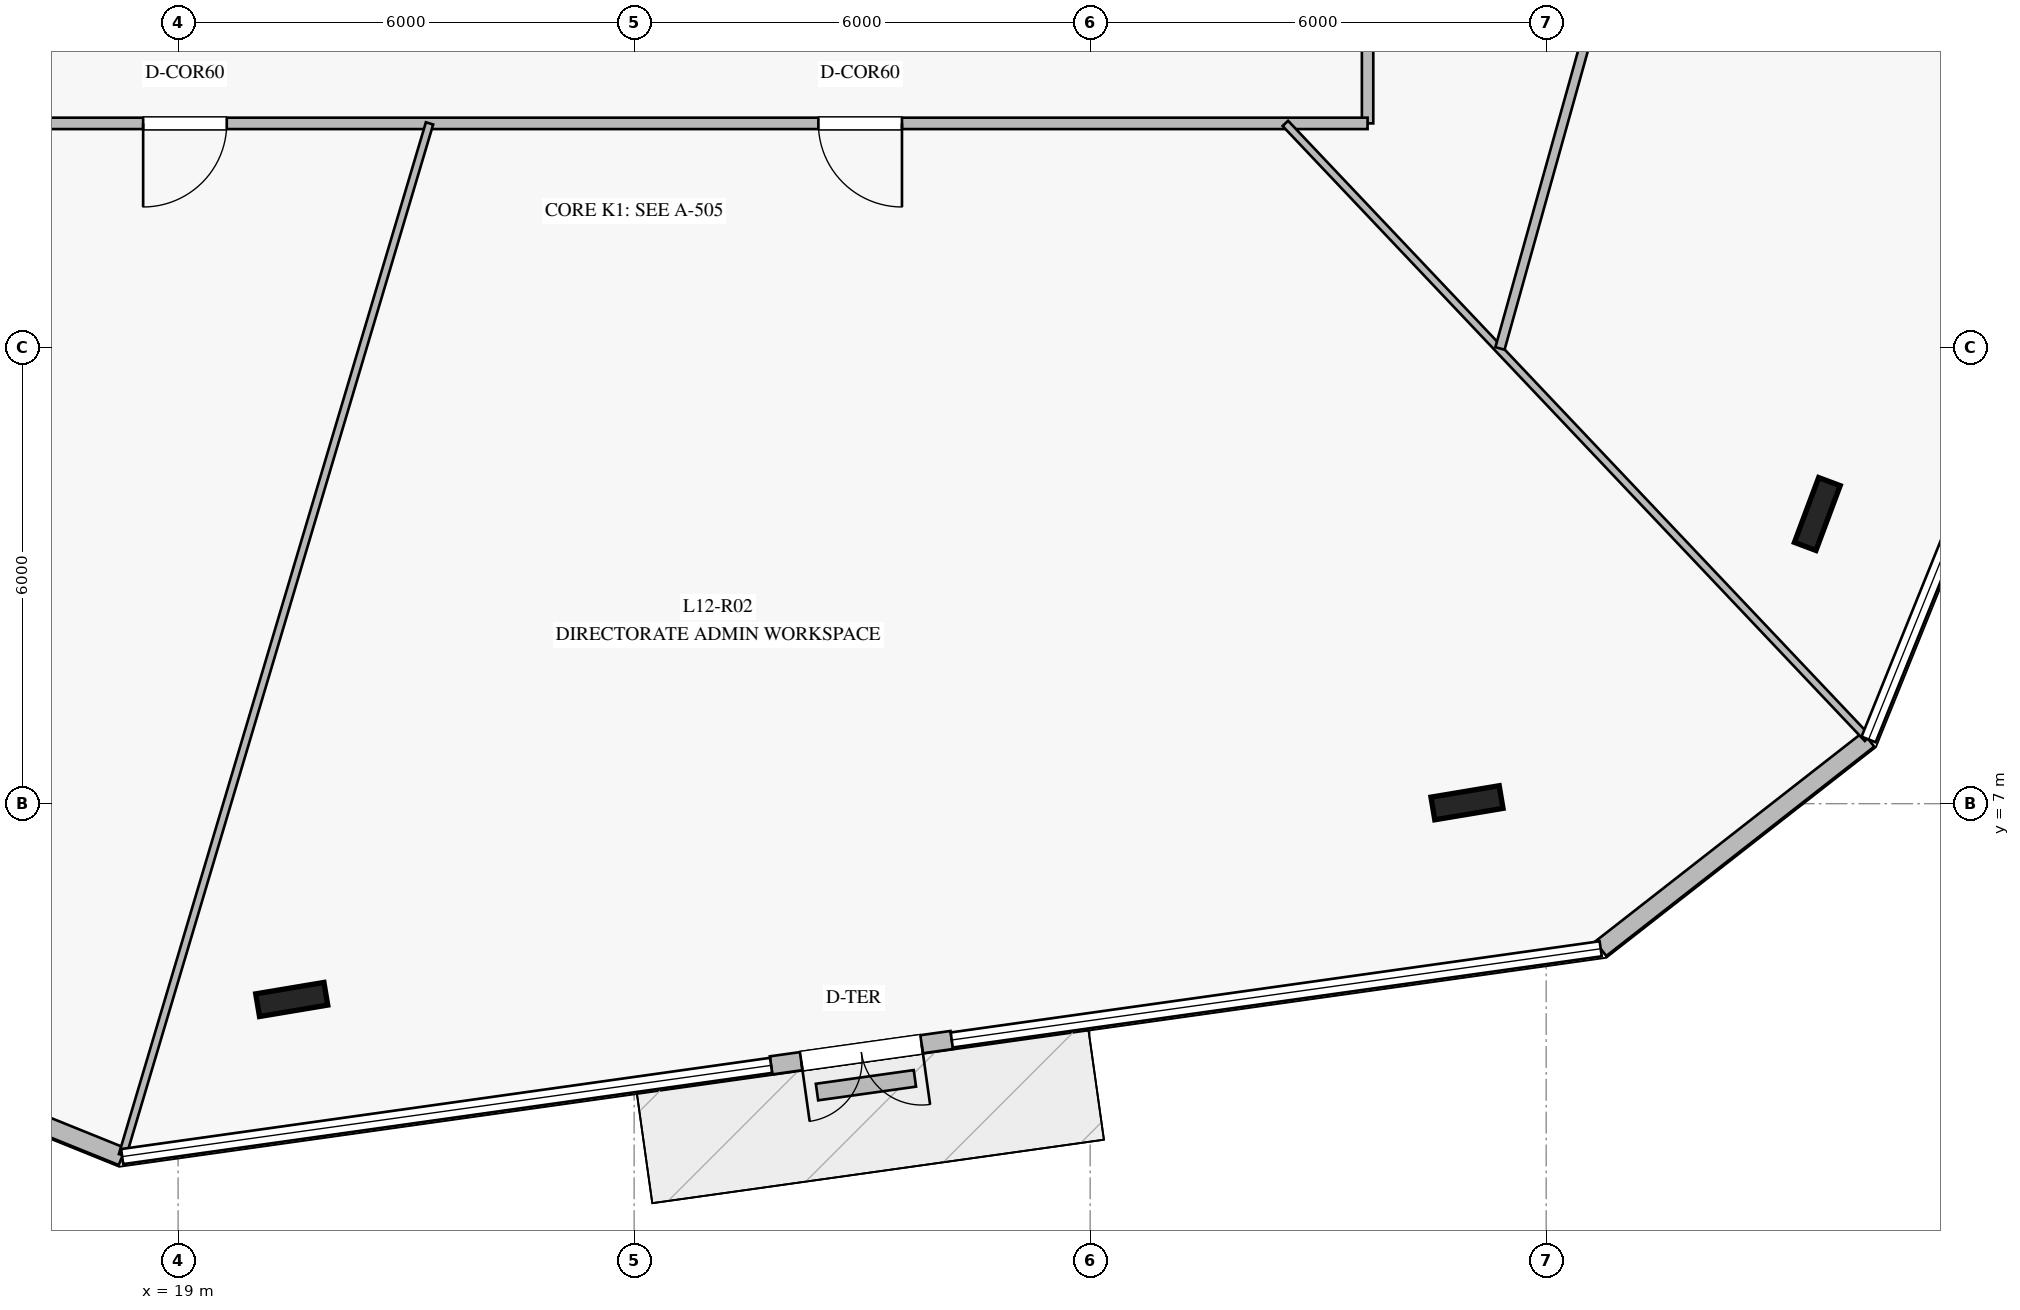
"""IFC4 building model, lengths in metres.
Left out: names, types, materials, properties, quantities, classifications, styles, units other than length and angle.
Written with IfcOpenShell. Run it as: python <this file> out.ifc"""

import sys

from ifc_helpers import new_model, si_unit, direction, frame, frame_2d, origin, origin_2d, place, context, subcontext, project, spatial, rectangle, i_section, extrude, element, fill, save


model = new_model("IFC4")
c1 = context("Model", 3, precision=1e-05, world=origin(), true_north=direction((0.0, 1.0)))
c2 = subcontext(c1, "Body", "Model", "MODEL_VIEW")
j1 = project(units=[si_unit("LENGTHUNIT", "METRE"), si_unit("PLANEANGLEUNIT", "RADIAN")], contexts=[c1])
p1 = place(None, origin())
s1 = spatial("IfcSite", under=j1, at=p1, CompositionType="ELEMENT")
p2 = place(p1, origin())
s2 = spatial("IfcBuilding", under=s1, at=p2, CompositionType="ELEMENT")
p3 = place(p2, frame((0.0, 0.0, 52.0)))
s3 = spatial("IfcBuildingStorey", under=s2, at=p3, CompositionType="ELEMENT", Elevation=52.0)
for number, where, z_axis, x_axis in (
    (1, (20.495, 4.424, 0.0), (0.0, 0.0, 1.0), (0.986, 0.165, 0.0)),
    (2, (35.958, 7.012, 0.0), (0.0, 0.0, 1.0), (0.986, 0.165, 0.0)),
    (3, (40.567, 10.811, 0.0), (0.0, 0.0, 1.0), (0.35, 0.937, 0.0)),
):
    element("IfcColumn", number, at=place(p3, frame(where, z_axis=z_axis, x_axis=x_axis)), inside=s3, PredefinedType="COLUMN", context=c2, shape_type="SweptSolid", body=[
        extrude(i_section(OverallWidth=0.302, OverallDepth=0.91, WebThickness=0.021, FlangeThickness=0.04, at=origin_2d()), origin(), (0.0, 0.0, 1.0), 4.0),
    ])
p4 = place(p3, frame((14.116, 4.033, 0.0), z_axis=(0.0, 0.0, 1.0), x_axis=(0.927172587255, -0.374634479783, 0.0)))
e4 = element("IfcWall", 4, at=p4, inside=s3, PredefinedType="STANDARD", context=c2, shape_type="SweptSolid", body=[
    extrude(rectangle(XDim=4.474, YDim=0.24, at=frame_2d((2.237, 0.0))), origin(), (0.0, 0.0, 1.0), 3.76),
])
p5 = place(p3, frame((26.802, 3.557, 0.0), z_axis=(0.0, 0.0, 1.0), x_axis=(0.990258331978, 0.139242364059, 0.0)))
e5 = element("IfcWall", 5, at=p5, inside=s3, PredefinedType="STANDARD", context=c2, shape_type="SweptSolid", body=[
    extrude(rectangle(XDim=2.4, YDim=0.24, at=frame_2d((1.2, 0.0))), origin(), (0.0, 0.0, 1.0), 3.76),
])
p6 = place(p5, frame((0.4, 0.0, 0.0)))
e6 = element("IfcOpeningElement", 6, at=p6, cuts=e5, PredefinedType="OPENING", context=c2, shape_type="SweptSolid", body=[
    extrude(rectangle(XDim=1.6, YDim=2.25, at=frame_2d((0.8, 1.125))), frame((0.0, 0.13, 0.0), z_axis=(0.0, -1.0, 0.0), x_axis=(1.0, 0.0, 0.0)), (0.0, 0.0, 1.0), 0.26),
])
p7 = place(p3, frame((37.717, 5.091, 0.0), z_axis=(0.0, 0.0, 1.0), x_axis=(0.788016099046, 0.615654633414, 0.0)))
e7 = element("IfcWall", 7, at=p7, inside=s3, PredefinedType="STANDARD", context=c2, shape_type="SweptSolid", body=[
    extrude(rectangle(XDim=4.473, YDim=0.24, at=frame_2d((2.237, 0.0))), origin(), (0.0, 0.0, 1.0), 3.76),
])
p8 = place(p3, frame((27.406, 3.206, 0.0), z_axis=(0.0, 0.0, 1.0), x_axis=(0.990383971487, 0.138345903523, 0.0)))
e8 = element("IfcWall", 8, at=p8, inside=s3, PredefinedType="USERDEFINED", context=c2, shape_type="SweptSolid", body=[
    extrude(rectangle(XDim=1.301, YDim=0.22, at=frame_2d((0.65, 0.0))), origin(), (0.0, 0.0, 1.0), 0.4),
])
p9 = place(p3, frame((34.65, 34.05, 0.0), z_axis=(0.0, 0.0, 1.0), x_axis=(0.0, -1.0, 0.0)))
e9 = element("IfcWall", 9, at=p9, inside=s3, PredefinedType="PARTITIONING", context=c2, shape_type="SweptSolid", body=[
    extrude(rectangle(XDim=18.1, YDim=0.15, at=frame_2d((9.05, 0.0))), origin(), (0.0, 0.0, 1.0), 3.21),
])
p10 = place(p9, frame((12.534, 0.0, 0.0)))
e10 = element("IfcOpeningElement", 10, at=p10, cuts=e9, PredefinedType="OPENING", context=c2, shape_type="SweptSolid", body=[
    extrude(rectangle(XDim=1.1, YDim=2.2, at=frame_2d((0.55, 1.1))), frame((0.0, 0.085, 0.0), z_axis=(0.0, -1.0, 0.0), x_axis=(1.0, 0.0, 0.0)), (0.0, 0.0, 1.0), 0.17),
])
p11 = place(p9, frame((3.853, 0.0, 0.0)))
e11 = element("IfcOpeningElement", 11, at=p11, cuts=e9, PredefinedType="OPENING", context=c2, shape_type="SweptSolid", body=[
    extrude(rectangle(XDim=1.1, YDim=2.2, at=frame_2d((0.55, 1.1))), frame((0.0, 0.085, 0.0), z_axis=(0.0, -1.0, 0.0), x_axis=(1.0, 0.0, 0.0)), (0.0, 0.0, 1.0), 0.17),
])
p12 = place(p3, frame((34.65, 15.95, 0.0), z_axis=(0.0, 0.0, 1.0), x_axis=(-1.0, 0.0, 0.0)))
e12 = element("IfcWall", 12, at=p12, inside=s3, PredefinedType="PARTITIONING", context=c2, shape_type="SweptSolid", body=[
    extrude(rectangle(XDim=19.3, YDim=0.15, at=frame_2d((9.65, 0.0))), origin(), (0.0, 0.0, 1.0), 3.21),
])
p13 = place(p12, frame((15.01, 0.0, 0.0)))
e13 = element("IfcOpeningElement", 13, at=p13, cuts=e12, PredefinedType="OPENING", context=c2, shape_type="SweptSolid", body=[
    extrude(rectangle(XDim=1.1, YDim=2.2, at=frame_2d((0.55, 1.1))), frame((0.0, 0.085, 0.0), z_axis=(0.0, -1.0, 0.0), x_axis=(1.0, 0.0, 0.0)), (0.0, 0.0, 1.0), 0.17),
])
p14 = place(p12, frame((6.126, 0.0, 0.0)))
e14 = element("IfcOpeningElement", 14, at=p14, cuts=e12, PredefinedType="OPENING", context=c2, shape_type="SweptSolid", body=[
    extrude(rectangle(XDim=1.1, YDim=2.2, at=frame_2d((0.55, 1.1))), frame((0.0, 0.085, 0.0), z_axis=(0.0, -1.0, 0.0), x_axis=(1.0, 0.0, 0.0)), (0.0, 0.0, 1.0), 0.17),
])
p15 = place(p3, frame((22.308, 15.95, 0.0), z_axis=(0.0, 0.0, 1.0), x_axis=(-0.285200995496, -0.958467731417, 0.0)))
e15 = element("IfcWall", 15, at=p15, inside=s3, PredefinedType="MOVABLE", context=c2, shape_type="SweptSolid", body=[
    extrude(rectangle(XDim=14.162, YDim=0.1, at=frame_2d((7.081, 0.0))), origin(), (0.0, 0.0, 1.0), 3.06),
])
p16 = place(p3, frame((33.568, 15.95, 0.0), z_axis=(0.0, 0.0, 1.0), x_axis=(0.687493592765, -0.726190443277, 0.0)))
e16 = element("IfcWall", 16, at=p16, inside=s3, PredefinedType="MOVABLE", context=c2, shape_type="SweptSolid", body=[
    extrude(rectangle(XDim=11.142, YDim=0.1, at=frame_2d((5.571, 0.0))), origin(), (0.0, 0.0, 1.0), 3.06),
])
p17 = place(p3, frame((36.392, 12.989, 0.0), z_axis=(0.0, 0.0, 1.0), x_axis=(0.268695208085, 0.963225251513, 0.0)))
e17 = element("IfcWall", 17, at=p17, inside=s3, PredefinedType="PARTITIONING", context=c2, shape_type="SweptSolid", body=[
    extrude(rectangle(XDim=13.149, YDim=0.125, at=frame_2d((6.574, 0.0))), origin(), (0.0, 0.0, 1.0), 3.21),
])
p18 = place(p17, frame((6.074, 0.0, 0.0)))
e18 = element("IfcOpeningElement", 18, at=p18, cuts=e17, PredefinedType="OPENING", context=c2, shape_type="SweptSolid", body=[
    extrude(rectangle(XDim=1.0, YDim=2.15, at=frame_2d((0.5, 1.075))), frame((0.0, 0.073, 0.0), z_axis=(0.0, -1.0, 0.0), x_axis=(1.0, 0.0, 0.0)), (0.0, 0.0, 1.0), 0.145),
])
p19 = place(p6, frame((1.6, 0.0, 0.0), z_axis=(0.0, 0.0, 1.0), x_axis=(-1.0, 0.0, 0.0)))
e19 = element("IfcDoor", 19, at=p19, inside=s3, OperationType="DOUBLE_DOOR_SINGLE_SWING", PredefinedType="DOOR", context=c2, shape_type="SweptSolid", body=[
    extrude(rectangle(XDim=1.6, YDim=2.25, at=frame_2d((0.8, 1.125))), frame((0.0, 0.025, 0.0), z_axis=(0.0, -1.0, 0.0), x_axis=(1.0, 0.0, 0.0)), (0.0, 0.0, 1.0), 0.05),
])
fill(e6, e19)
p20 = place(p13, origin())
e20 = element("IfcDoor", 20, at=p20, inside=s3, OperationType="SINGLE_SWING_RIGHT", PredefinedType="DOOR", context=c2, shape_type="SweptSolid", body=[
    extrude(rectangle(XDim=1.1, YDim=2.2, at=frame_2d((0.55, 1.1))), frame((0.0, 0.025, 0.0), z_axis=(0.0, -1.0, 0.0), x_axis=(1.0, 0.0, 0.0)), (0.0, 0.0, 1.0), 0.05),
])
fill(e13, e20)
p21 = place(p14, origin())
e21 = element("IfcDoor", 21, at=p21, inside=s3, OperationType="SINGLE_SWING_LEFT", PredefinedType="DOOR", context=c2, shape_type="SweptSolid", body=[
    extrude(rectangle(XDim=1.1, YDim=2.2, at=frame_2d((0.55, 1.1))), frame((0.0, 0.025, 0.0), z_axis=(0.0, -1.0, 0.0), x_axis=(1.0, 0.0, 0.0)), (0.0, 0.0, 1.0), 0.05),
])
fill(e14, e21)
save(model, sys.argv[1])
